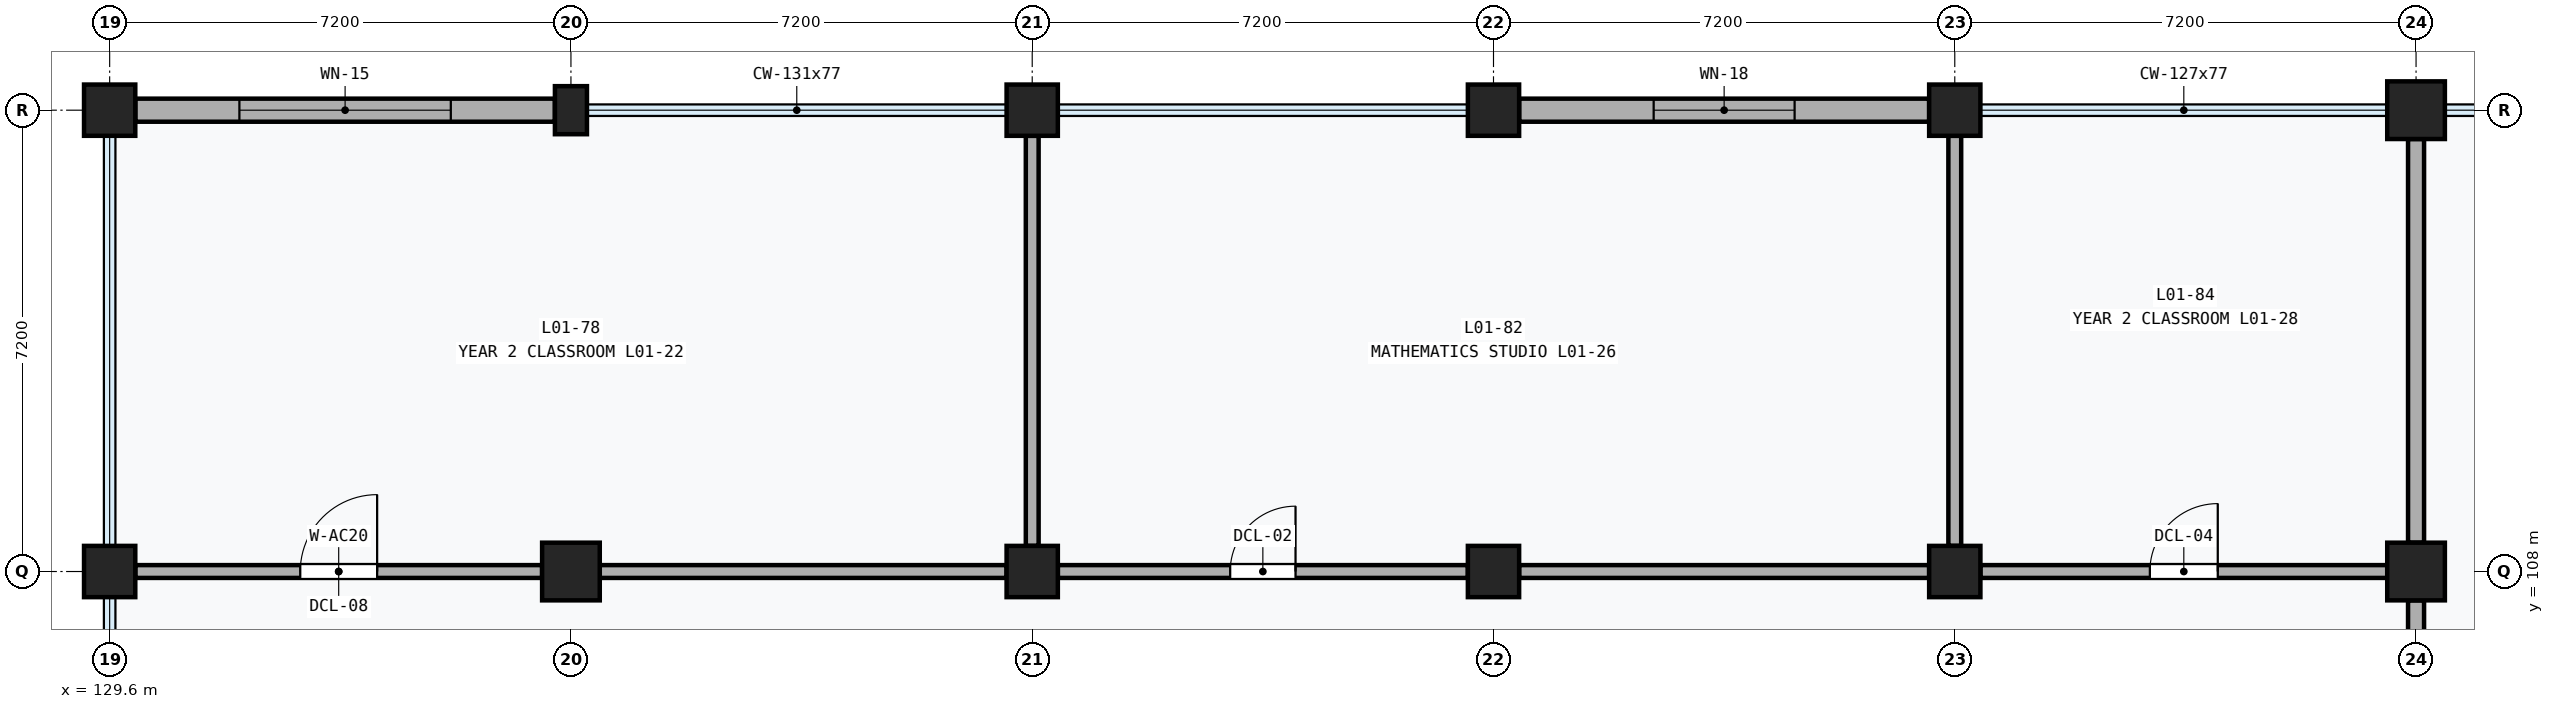
"""IFC4 building model, lengths in metres.
Left out: names, types, materials, properties, quantities, classifications, styles, units other than length and angle.
Written with IfcOpenShell. Run it as: python <this file> out.ifc"""

import sys

from ifc_helpers import new_model, si_unit, direction, frame, frame_2d, origin, origin_2d, place, context, subcontext, project, spatial, rectangle, extrude, element, fill, save


model = new_model("IFC4")
c1 = context("Model", 3, precision=1e-05, world=origin(), true_north=direction((0.0, 1.0)))
c2 = subcontext(c1, "Body", "Model", "MODEL_VIEW")
j1 = project(units=[si_unit("LENGTHUNIT", "METRE"), si_unit("PLANEANGLEUNIT", "RADIAN")], contexts=[c1])
p1 = place(None, origin())
s1 = spatial("IfcSite", under=j1, at=p1, CompositionType="ELEMENT")
p2 = place(p1, origin())
s2 = spatial("IfcBuilding", under=s1, at=p2, CompositionType="ELEMENT")
p3 = place(p2, frame((0.0, 0.0, 4.8)))
s3 = spatial("IfcBuildingStorey", under=s2, at=p3, CompositionType="ELEMENT", Elevation=4.8)
for number, where, z_axis, x_axis in (
    (1, (129.6, 108.0, 0.0), (0.0, 0.0, 1.0), (1.0, 0.0, 0.0)),
    (2, (129.6, 115.2, 0.0), (0.0, 0.0, 1.0), (1.0, 0.0, 0.0)),
):
    element("IfcColumn", number, at=place(p3, frame(where, z_axis=z_axis, x_axis=x_axis)), inside=s3, PredefinedType="COLUMN", context=c2, shape_type="SweptSolid", body=[
        extrude(rectangle(XDim=0.8, YDim=0.8, at=origin_2d()), origin(), (0.0, 0.0, 1.0), 4.8),
    ])
p4 = place(p3, frame((136.8, 108.0, 0.0), z_axis=(0.0, 0.0, 1.0), x_axis=(1.0, 0.0, 0.0)))
e3 = element("IfcColumn", 3, at=p4, inside=s3, PredefinedType="COLUMN", context=c2, shape_type="SweptSolid", body=[
    extrude(rectangle(XDim=0.9, YDim=0.9, at=origin_2d()), origin(), (0.0, 0.0, 1.0), 4.8),
])
p5 = place(p3, frame((136.8, 115.2, 0.0), z_axis=(0.0, 0.0, 1.0), x_axis=(1.0, 0.0, 0.0)))
e4 = element("IfcColumn", 4, at=p5, inside=s3, PredefinedType="PILASTER", context=c2, shape_type="SweptSolid", body=[
    extrude(rectangle(XDim=0.5, YDim=0.75, at=origin_2d()), origin(), (0.0, 0.0, 1.0), 4.8),
])
for number, where, z_axis, x_axis in (
    (5, (144.0, 108.0, 0.0), (0.0, 0.0, 1.0), (1.0, 0.0, 0.0)),
    (6, (144.0, 115.2, 0.0), (0.0, 0.0, 1.0), (1.0, 0.0, 0.0)),
    (7, (151.2, 108.0, 0.0), (0.0, 0.0, 1.0), (1.0, 0.0, 0.0)),
    (8, (151.2, 115.2, 0.0), (0.0, 0.0, 1.0), (1.0, 0.0, 0.0)),
    (9, (158.4, 108.0, 0.0), (0.0, 0.0, 1.0), (1.0, 0.0, 0.0)),
    (10, (158.4, 115.2, 0.0), (0.0, 0.0, 1.0), (1.0, 0.0, 0.0)),
):
    element("IfcColumn", number, at=place(p3, frame(where, z_axis=z_axis, x_axis=x_axis)), inside=s3, PredefinedType="COLUMN", context=c2, shape_type="SweptSolid", body=[
        extrude(rectangle(XDim=0.8, YDim=0.8, at=origin_2d()), origin(), (0.0, 0.0, 1.0), 4.8),
    ])
for number, where, z_axis, x_axis in (
    (11, (165.6, 108.0, 0.0), (0.0, 0.0, 1.0), (1.0, 0.0, 0.0)),
    (12, (165.6, 115.2, 0.0), (0.0, 0.0, 1.0), (1.0, 0.0, 0.0)),
):
    element("IfcColumn", number, at=place(p3, frame(where, z_axis=z_axis, x_axis=x_axis)), inside=s3, PredefinedType="COLUMN", context=c2, shape_type="SweptSolid", body=[
        extrude(rectangle(XDim=0.9, YDim=0.9, at=origin_2d()), origin(), (0.0, 0.0, 1.0), 4.8),
    ])
p6 = place(p3, frame((130.0, 115.2, 0.0), z_axis=(0.0, 0.0, 1.0), x_axis=(1.0, 0.0, 0.0)))
e13 = element("IfcWall", 13, at=p6, inside=s3, PredefinedType="SOLIDWALL", context=c2, shape_type="SweptSolid", body=[
    extrude(rectangle(XDim=6.55, YDim=0.36, at=frame_2d((3.275, 0.0))), origin(), (0.0, 0.0, 1.0), 3.85),
])
p7 = place(p6, frame((1.625, 0.0, 0.85)))
e14 = element("IfcOpeningElement", 14, at=p7, cuts=e13, PredefinedType="OPENING", context=c2, shape_type="SweptSolid", body=[
    extrude(rectangle(XDim=3.3, YDim=2.0, at=frame_2d((1.65, 1.0))), frame((0.0, 0.192, 0.0), z_axis=(0.0, -1.0, 0.0), x_axis=(1.0, 0.0, 0.0)), (0.0, 0.0, 1.0), 0.384),
])
p8 = place(p3, frame((151.6, 115.2, 0.0), z_axis=(0.0, 0.0, 1.0), x_axis=(1.0, 0.0, 0.0)))
e15 = element("IfcWall", 15, at=p8, inside=s3, PredefinedType="SOLIDWALL", context=c2, shape_type="SweptSolid", body=[
    extrude(rectangle(XDim=6.4, YDim=0.36, at=frame_2d((3.2, 0.0))), origin(), (0.0, 0.0, 1.0), 3.85),
])
p9 = place(p8, frame((2.1, 0.0, 1.1)))
e16 = element("IfcOpeningElement", 16, at=p9, cuts=e15, PredefinedType="OPENING", context=c2, shape_type="SweptSolid", body=[
    extrude(rectangle(XDim=2.2, YDim=1.5, at=frame_2d((1.1, 0.75))), frame((0.0, 0.192, 0.0), z_axis=(0.0, -1.0, 0.0), x_axis=(1.0, 0.0, 0.0)), (0.0, 0.0, 1.0), 0.384),
])
p10 = place(p3, frame((165.6, 101.25, 0.0), z_axis=(0.0, 0.0, 1.0), x_axis=(0.0, 1.0, 0.0)))
e17 = element("IfcWall", 17, at=p10, inside=s3, PredefinedType="PARTITIONING", context=c2, shape_type="SweptSolid", body=[
    extrude(rectangle(XDim=6.3, YDim=0.25, at=frame_2d((3.15, 0.0))), origin(), (0.0, 0.0, 1.0), 3.58),
])
p11 = place(p10, frame((2.1, 0.0, 0.0)))
e18 = element("IfcOpeningElement", 18, at=p11, cuts=e17, PredefinedType="OPENING", context=c2, shape_type="SweptSolid", body=[
    extrude(rectangle(XDim=2.1, YDim=2.4, at=frame_2d((1.05, 1.2))), frame((0.0, 0.137, 0.0), z_axis=(0.0, -1.0, 0.0), x_axis=(1.0, 0.0, 0.0)), (0.0, 0.0, 1.0), 0.274),
])
p12 = place(p3, frame((165.6, 108.45, 0.0), z_axis=(0.0, 0.0, 1.0), x_axis=(0.0, 1.0, 0.0)))
e19 = element("IfcWall", 19, at=p12, inside=s3, PredefinedType="PARTITIONING", context=c2, shape_type="SweptSolid", body=[
    extrude(rectangle(XDim=6.3, YDim=0.25, at=frame_2d((3.15, 0.0))), origin(), (0.0, 0.0, 1.0), 3.58),
])
p13 = place(p3, frame((130.0, 108.0, 0.0), z_axis=(0.0, 0.0, 1.0), x_axis=(1.0, 0.0, 0.0)))
e20 = element("IfcWall", 20, at=p13, inside=s3, PredefinedType="PARTITIONING", context=c2, shape_type="SweptSolid", body=[
    extrude(rectangle(XDim=6.35, YDim=0.2, at=frame_2d((3.175, 0.0))), origin(), (0.0, 0.0, 1.0), 3.58),
])
p14 = place(p13, frame((2.575, 0.0, 0.0)))
e21 = element("IfcOpeningElement", 21, at=p14, cuts=e20, PredefinedType="OPENING", context=c2, shape_type="SweptSolid", body=[
    extrude(rectangle(XDim=1.2, YDim=2.24, at=frame_2d((0.6, 1.12))), frame((0.0, 0.112, 0.0), z_axis=(0.0, -1.0, 0.0), x_axis=(1.0, 0.0, 0.0)), (0.0, 0.0, 1.0), 0.224),
])
p15 = place(p3, frame((137.25, 108.0, 0.0), z_axis=(0.0, 0.0, 1.0), x_axis=(1.0, 0.0, 0.0)))
e22 = element("IfcWall", 22, at=p15, inside=s3, PredefinedType="PARTITIONING", context=c2, shape_type="SweptSolid", body=[
    extrude(rectangle(XDim=6.35, YDim=0.2, at=frame_2d((3.175, 0.0))), origin(), (0.0, 0.0, 1.0), 3.58),
])
p16 = place(p3, frame((144.0, 108.4, 0.0), z_axis=(0.0, 0.0, 1.0), x_axis=(0.0, 1.0, 0.0)))
e23 = element("IfcWall", 23, at=p16, inside=s3, PredefinedType="PARTITIONING", context=c2, shape_type="SweptSolid", body=[
    extrude(rectangle(XDim=6.4, YDim=0.2, at=frame_2d((3.2, 0.0))), origin(), (0.0, 0.0, 1.0), 3.58),
])
p17 = place(p3, frame((144.4, 108.0, 0.0), z_axis=(0.0, 0.0, 1.0), x_axis=(1.0, 0.0, 0.0)))
e24 = element("IfcWall", 24, at=p17, inside=s3, PredefinedType="PARTITIONING", context=c2, shape_type="SweptSolid", body=[
    extrude(rectangle(XDim=6.4, YDim=0.2, at=frame_2d((3.2, 0.0))), origin(), (0.0, 0.0, 1.0), 3.58),
])
p18 = place(p17, frame((2.69, 0.0, 0.0)))
e25 = element("IfcOpeningElement", 25, at=p18, cuts=e24, PredefinedType="OPENING", context=c2, shape_type="SweptSolid", body=[
    extrude(rectangle(XDim=1.02, YDim=2.12, at=frame_2d((0.51, 1.06))), frame((0.0, 0.112, 0.0), z_axis=(0.0, -1.0, 0.0), x_axis=(1.0, 0.0, 0.0)), (0.0, 0.0, 1.0), 0.224),
])
p19 = place(p3, frame((151.6, 108.0, 0.0), z_axis=(0.0, 0.0, 1.0), x_axis=(1.0, 0.0, 0.0)))
e26 = element("IfcWall", 26, at=p19, inside=s3, PredefinedType="PARTITIONING", context=c2, shape_type="SweptSolid", body=[
    extrude(rectangle(XDim=6.4, YDim=0.2, at=frame_2d((3.2, 0.0))), origin(), (0.0, 0.0, 1.0), 3.58),
])
p20 = place(p3, frame((158.4, 108.4, 0.0), z_axis=(0.0, 0.0, 1.0), x_axis=(0.0, 1.0, 0.0)))
e27 = element("IfcWall", 27, at=p20, inside=s3, PredefinedType="PARTITIONING", context=c2, shape_type="SweptSolid", body=[
    extrude(rectangle(XDim=6.4, YDim=0.2, at=frame_2d((3.2, 0.0))), origin(), (0.0, 0.0, 1.0), 3.58),
])
p21 = place(p3, frame((158.8, 108.0, 0.0), z_axis=(0.0, 0.0, 1.0), x_axis=(1.0, 0.0, 0.0)))
e28 = element("IfcWall", 28, at=p21, inside=s3, PredefinedType="PARTITIONING", context=c2, shape_type="SweptSolid", body=[
    extrude(rectangle(XDim=6.35, YDim=0.2, at=frame_2d((3.175, 0.0))), origin(), (0.0, 0.0, 1.0), 3.58),
])
p22 = place(p21, frame((2.645, 0.0, 0.0)))
e29 = element("IfcOpeningElement", 29, at=p22, cuts=e28, PredefinedType="OPENING", context=c2, shape_type="SweptSolid", body=[
    extrude(rectangle(XDim=1.06, YDim=2.16, at=frame_2d((0.53, 1.08))), frame((0.0, 0.112, 0.0), z_axis=(0.0, -1.0, 0.0), x_axis=(1.0, 0.0, 0.0)), (0.0, 0.0, 1.0), 0.224),
])
p23 = place(p7, origin())
e30 = element("IfcWindow", 30, at=p23, inside=s3, PartitioningType="SINGLE_PANEL", PredefinedType="WINDOW", context=c2, shape_type="SweptSolid", body=[
    extrude(rectangle(XDim=3.3, YDim=2.0, at=frame_2d((1.65, 1.0))), frame((0.0, 0.03, 0.0), z_axis=(0.0, -1.0, 0.0), x_axis=(1.0, 0.0, 0.0)), (0.0, 0.0, 1.0), 0.06),
])
fill(e14, e30)
p24 = place(p9, origin())
e31 = element("IfcWindow", 31, at=p24, inside=s3, PartitioningType="SINGLE_PANEL", PredefinedType="WINDOW", context=c2, shape_type="SweptSolid", body=[
    extrude(rectangle(XDim=2.2, YDim=1.5, at=frame_2d((1.1, 0.75))), frame((0.0, 0.03, 0.0), z_axis=(0.0, -1.0, 0.0), x_axis=(1.0, 0.0, 0.0)), (0.0, 0.0, 1.0), 0.06),
])
fill(e16, e31)
p25 = place(p14, origin())
e32 = element("IfcDoor", 32, at=p25, inside=s3, OperationType="SINGLE_SWING_RIGHT", PredefinedType="DOOR", context=c2, shape_type="SweptSolid", body=[
    extrude(rectangle(XDim=1.2, YDim=2.24, at=frame_2d((0.6, 1.12))), frame((0.0, 0.025, 0.0), z_axis=(0.0, -1.0, 0.0), x_axis=(1.0, 0.0, 0.0)), (0.0, 0.0, 1.0), 0.05),
])
fill(e21, e32)
p26 = place(p18, origin())
e33 = element("IfcDoor", 33, at=p26, inside=s3, OperationType="SINGLE_SWING_RIGHT", PredefinedType="DOOR", context=c2, shape_type="SweptSolid", body=[
    extrude(rectangle(XDim=1.02, YDim=2.12, at=frame_2d((0.51, 1.06))), frame((0.0, 0.025, 0.0), z_axis=(0.0, -1.0, 0.0), x_axis=(1.0, 0.0, 0.0)), (0.0, 0.0, 1.0), 0.05),
])
fill(e25, e33)
p27 = place(p22, origin())
e34 = element("IfcDoor", 34, at=p27, inside=s3, OperationType="SINGLE_SWING_RIGHT", PredefinedType="DOOR", context=c2, shape_type="SweptSolid", body=[
    extrude(rectangle(XDim=1.06, YDim=2.16, at=frame_2d((0.53, 1.08))), frame((0.0, 0.025, 0.0), z_axis=(0.0, -1.0, 0.0), x_axis=(1.0, 0.0, 0.0)), (0.0, 0.0, 1.0), 0.05),
])
fill(e29, e34)
save(model, sys.argv[1])
